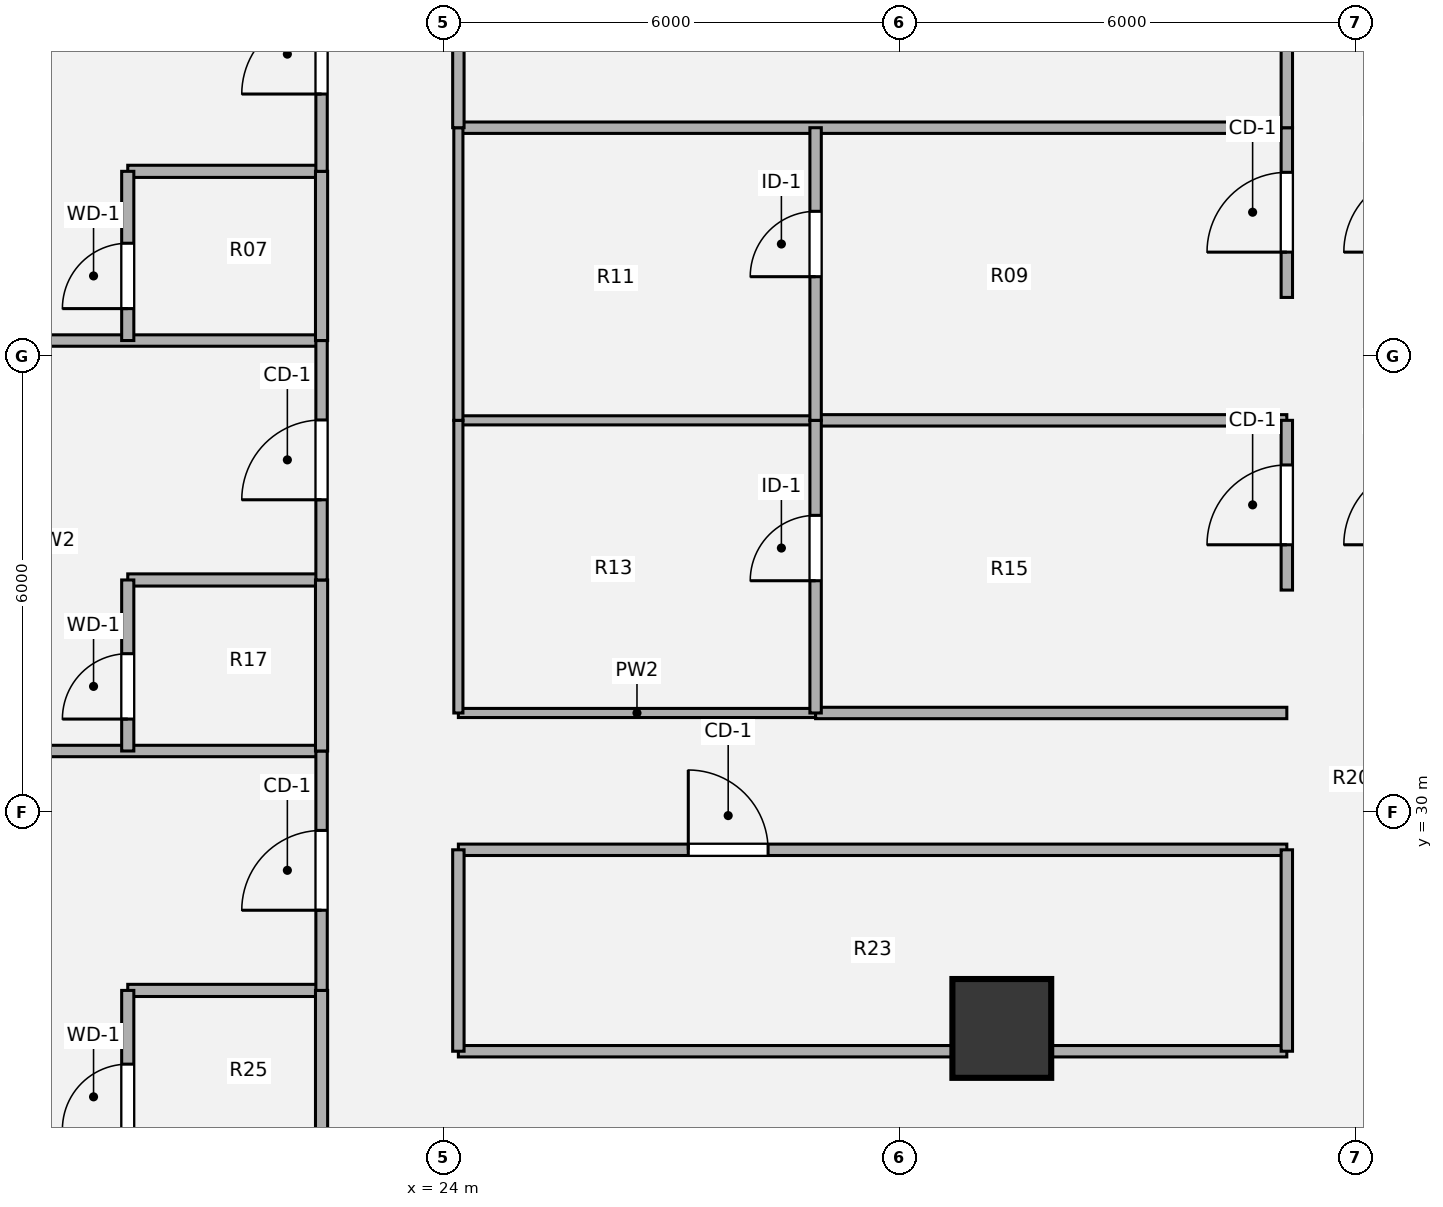
"""IFC4 building model, lengths in metres.
Left out: names, types, materials, properties, quantities, classifications, styles, units other than length and angle.
Written with IfcOpenShell. Run it as: python <this file> out.ifc"""

import sys

from ifc_helpers import new_model, si_unit, direction, frame, frame_2d, origin, origin_2d, place, context, subcontext, project, spatial, rectangle, hollow_circle, extrude, source, transform, mapped, element, fill, save


model = new_model("IFC4")
c1 = context("Model", 3, precision=1e-05, world=origin(), true_north=direction((0.0, 1.0)))
c2 = subcontext(c1, "Body", "Model", "MODEL_VIEW")
j1 = project(units=[si_unit("LENGTHUNIT", "METRE"), si_unit("PLANEANGLEUNIT", "RADIAN")], contexts=[c1])
p1 = place(None, origin())
s1 = spatial("IfcSite", under=j1, at=p1, CompositionType="ELEMENT")
p2 = place(p1, origin())
s2 = spatial("IfcBuilding", under=s1, at=p2, CompositionType="ELEMENT")
p3 = place(p2, frame((0.0, 0.0, 135.18)))
s3 = spatial("IfcBuildingStorey", under=s2, at=p3, CompositionType="ELEMENT", Elevation=135.18)
m1 = source(origin(), c2, "Body", "SweptSolid", [
    extrude(hollow_circle(Radius=0.65, WallThickness=0.045, at=origin_2d()), origin(), (0.0, 0.0, 1.0), 3.78),
])
p4 = place(p3, frame((31.35, 27.15, 0.0), z_axis=(0.0, 0.0, 1.0), x_axis=(1.0, 0.0, 0.0)))
e1 = element("IfcColumn", 1, at=p4, inside=s3, PredefinedType="COLUMN", context=c2, shape_type="MappedRepresentation", body=[
    mapped(m1, transform((0.0, 0.0, 0.0), x_axis=(1.0, 0.0, 0.0), y_axis=(0.0, 1.0, 0.0), z_axis=(0.0, 0.0, 1.0), scale=1.0)),
])
p5 = place(p3, frame((24.2, 26.85, 0.0), z_axis=(0.0, 0.0, 1.0), x_axis=(1.0, 0.0, 0.0)))
e2 = element("IfcWall", 2, at=p5, inside=s3, PredefinedType="PARTITIONING", context=c2, shape_type="SweptSolid", body=[
    extrude(rectangle(XDim=10.9, YDim=0.15, at=frame_2d((5.45, 0.0))), origin(), (0.0, 0.0, 1.0), 2.903),
])
p6 = place(p3, frame((19.85, 27.65, 0.0), z_axis=(0.0, 0.0, 1.0), x_axis=(1.0, 0.0, 0.0)))
e3 = element("IfcWall", 3, at=p6, inside=s3, PredefinedType="PLUMBINGWALL", context=c2, shape_type="SweptSolid", body=[
    extrude(rectangle(XDim=2.55, YDim=0.16, at=frame_2d((1.275, 0.0))), origin(), (0.0, 0.0, 1.0), 2.982),
])
p7 = place(p3, frame((24.2, 29.5, 0.0), z_axis=(0.0, 0.0, 1.0), x_axis=(1.0, 0.0, 0.0)))
e4 = element("IfcWall", 4, at=p7, inside=s3, PredefinedType="PARTITIONING", context=c2, shape_type="SweptSolid", body=[
    extrude(rectangle(XDim=10.9, YDim=0.15, at=frame_2d((5.45, 0.0))), origin(), (0.0, 0.0, 1.0), 2.982),
])
p8 = place(p7, frame((3.025, 0.0, 0.0)))
e5 = element("IfcOpeningElement", 5, at=p8, cuts=e4, PredefinedType="OPENING", context=c2, shape_type="SweptSolid", body=[
    extrude(rectangle(XDim=1.05, YDim=2.1, at=origin_2d()), frame((0.525, 0.085, 1.05), z_axis=(0.0, -1.0, 0.0), x_axis=(1.0, 0.0, 0.0)), (0.0, 0.0, 1.0), 0.17),
])
p9 = place(p3, frame((13.98, 30.8, 0.0), z_axis=(0.0, 0.0, 1.0), x_axis=(1.0, 0.0, 0.0)))
e6 = element("IfcWall", 6, at=p9, inside=s3, PredefinedType="PARTITIONING", context=c2, shape_type="SweptSolid", body=[
    extrude(rectangle(XDim=8.42, YDim=0.15, at=frame_2d((4.21, 0.0))), origin(), (0.0, 0.0, 1.0), 2.982),
])
p10 = place(p3, frame((24.2, 31.3, 0.0), z_axis=(0.0, 0.0, 1.0), x_axis=(1.0, 0.0, 0.0)))
e7 = element("IfcWall", 7, at=p10, inside=s3, PredefinedType="PARTITIONING", context=c2, shape_type="SweptSolid", body=[
    extrude(rectangle(XDim=4.7, YDim=0.12, at=frame_2d((2.35, 0.0))), origin(), (0.0, 0.0, 1.0), 2.982),
])
p11 = place(p3, frame((28.9, 31.3, 0.0), z_axis=(0.0, 0.0, 1.0), x_axis=(1.0, 0.0, 0.0)))
e8 = element("IfcWall", 8, at=p11, inside=s3, PredefinedType="PARTITIONING", context=c2, shape_type="SweptSolid", body=[
    extrude(rectangle(XDim=6.2, YDim=0.15, at=frame_2d((3.1, 0.0))), origin(), (0.0, 0.0, 1.0), 2.982),
])
p12 = place(p3, frame((19.85, 33.05, 0.0), z_axis=(0.0, 0.0, 1.0), x_axis=(1.0, 0.0, 0.0)))
e9 = element("IfcWall", 9, at=p12, inside=s3, PredefinedType="PLUMBINGWALL", context=c2, shape_type="SweptSolid", body=[
    extrude(rectangle(XDim=2.55, YDim=0.16, at=frame_2d((1.275, 0.0))), origin(), (0.0, 0.0, 1.0), 2.982),
])
p13 = place(p3, frame((24.2, 35.15, 0.0), z_axis=(0.0, 0.0, 1.0), x_axis=(1.0, 0.0, 0.0)))
e10 = element("IfcWall", 10, at=p13, inside=s3, PredefinedType="PARTITIONING", context=c2, shape_type="SweptSolid", body=[
    extrude(rectangle(XDim=4.7, YDim=0.12, at=frame_2d((2.35, 0.0))), origin(), (0.0, 0.0, 1.0), 2.982),
])
p14 = place(p3, frame((28.9, 35.15, 0.0), z_axis=(0.0, 0.0, 1.0), x_axis=(1.0, 0.0, 0.0)))
e11 = element("IfcWall", 11, at=p14, inside=s3, PredefinedType="PARTITIONING", context=c2, shape_type="SweptSolid", body=[
    extrude(rectangle(XDim=6.2, YDim=0.15, at=frame_2d((3.1, 0.0))), origin(), (0.0, 0.0, 1.0), 2.982),
])
p15 = place(p3, frame((13.98, 36.2, 0.0), z_axis=(0.0, 0.0, 1.0), x_axis=(1.0, 0.0, 0.0)))
e12 = element("IfcWall", 12, at=p15, inside=s3, PredefinedType="PARTITIONING", context=c2, shape_type="SweptSolid", body=[
    extrude(rectangle(XDim=8.42, YDim=0.15, at=frame_2d((4.21, 0.0))), origin(), (0.0, 0.0, 1.0), 2.982),
])
p16 = place(p3, frame((19.85, 38.426, 0.0), z_axis=(0.0, 0.0, 1.0), x_axis=(1.0, 0.0, 0.0)))
e13 = element("IfcWall", 13, at=p16, inside=s3, PredefinedType="PLUMBINGWALL", context=c2, shape_type="SweptSolid", body=[
    extrude(rectangle(XDim=2.55, YDim=0.16, at=frame_2d((1.275, 0.0))), origin(), (0.0, 0.0, 1.0), 3.055),
])
p17 = place(p3, frame((24.2, 39.0, 0.0), z_axis=(0.0, 0.0, 1.0), x_axis=(1.0, 0.0, 0.0)))
e14 = element("IfcWall", 14, at=p17, inside=s3, PredefinedType="PARTITIONING", context=c2, shape_type="SweptSolid", body=[
    extrude(rectangle(XDim=10.9, YDim=0.15, at=frame_2d((5.45, 0.0))), origin(), (0.0, 0.0, 1.0), 2.903),
])
p18 = place(p3, frame((19.85, 25.4, 0.0), z_axis=(0.0, 0.0, 1.0), x_axis=(0.0, 1.0, 0.0)))
e15 = element("IfcWall", 15, at=p18, inside=s3, PredefinedType="PLUMBINGWALL", context=c2, shape_type="SweptSolid", body=[
    extrude(rectangle(XDim=2.25, YDim=0.16, at=frame_2d((1.125, 0.0))), origin(), (0.0, 0.0, 1.0), 3.5),
])
p19 = place(p18, frame((0.42, 0.0, 0.0)))
e16 = element("IfcOpeningElement", 16, at=p19, cuts=e15, PredefinedType="OPENING", context=c2, shape_type="SweptSolid", body=[
    extrude(rectangle(XDim=0.86, YDim=2.1, at=origin_2d()), frame((0.43, 0.09, 1.05), z_axis=(0.0, -1.0, 0.0), x_axis=(1.0, 0.0, 0.0)), (0.0, 0.0, 1.0), 0.18),
])
p20 = place(p3, frame((19.85, 30.8, 0.0), z_axis=(0.0, 0.0, 1.0), x_axis=(0.0, 1.0, 0.0)))
e17 = element("IfcWall", 17, at=p20, inside=s3, PredefinedType="PLUMBINGWALL", context=c2, shape_type="SweptSolid", body=[
    extrude(rectangle(XDim=2.25, YDim=0.16, at=frame_2d((1.125, 0.0))), origin(), (0.0, 0.0, 1.0), 3.5),
])
p21 = place(p20, frame((0.42, 0.0, 0.0)))
e18 = element("IfcOpeningElement", 18, at=p21, cuts=e17, PredefinedType="OPENING", context=c2, shape_type="SweptSolid", body=[
    extrude(rectangle(XDim=0.86, YDim=2.1, at=origin_2d()), frame((0.43, 0.09, 1.05), z_axis=(0.0, -1.0, 0.0), x_axis=(1.0, 0.0, 0.0)), (0.0, 0.0, 1.0), 0.18),
])
p22 = place(p3, frame((19.85, 36.2, 0.0), z_axis=(0.0, 0.0, 1.0), x_axis=(0.0, 1.0, 0.0)))
e19 = element("IfcWall", 19, at=p22, inside=s3, PredefinedType="PLUMBINGWALL", context=c2, shape_type="SweptSolid", body=[
    extrude(rectangle(XDim=2.226, YDim=0.16, at=frame_2d((1.113, 0.0))), origin(), (0.0, 0.0, 1.0), 3.5),
])
p23 = place(p22, frame((0.42, 0.0, 0.0)))
e20 = element("IfcOpeningElement", 20, at=p23, cuts=e19, PredefinedType="OPENING", context=c2, shape_type="SweptSolid", body=[
    extrude(rectangle(XDim=0.86, YDim=2.1, at=origin_2d()), frame((0.43, 0.09, 1.05), z_axis=(0.0, -1.0, 0.0), x_axis=(1.0, 0.0, 0.0)), (0.0, 0.0, 1.0), 0.18),
])
p24 = place(p3, frame((22.4, 25.4, 0.0), z_axis=(0.0, 0.0, 1.0), x_axis=(0.0, 1.0, 0.0)))
e21 = element("IfcWall", 21, at=p24, inside=s3, PredefinedType="PLUMBINGWALL", context=c2, shape_type="SweptSolid", body=[
    extrude(rectangle(XDim=2.25, YDim=0.16, at=frame_2d((1.125, 0.0))), origin(), (0.0, 0.0, 1.0), 3.5),
])
p25 = place(p3, frame((22.4, 27.65, 0.0), z_axis=(0.0, 0.0, 1.0), x_axis=(0.0, 1.0, 0.0)))
e22 = element("IfcWall", 22, at=p25, inside=s3, PredefinedType="PARTITIONING", context=c2, shape_type="SweptSolid", body=[
    extrude(rectangle(XDim=3.15, YDim=0.15, at=frame_2d((1.575, 0.0))), origin(), (0.0, 0.0, 1.0), 3.5),
])
p26 = place(p25, frame((1.055, 0.0, 0.0)))
e23 = element("IfcOpeningElement", 23, at=p26, cuts=e22, PredefinedType="OPENING", context=c2, shape_type="SweptSolid", body=[
    extrude(rectangle(XDim=1.05, YDim=2.1, at=origin_2d()), frame((0.525, 0.085, 1.05), z_axis=(0.0, -1.0, 0.0), x_axis=(1.0, 0.0, 0.0)), (0.0, 0.0, 1.0), 0.17),
])
p27 = place(p3, frame((22.4, 30.8, 0.0), z_axis=(0.0, 0.0, 1.0), x_axis=(0.0, 1.0, 0.0)))
e24 = element("IfcWall", 24, at=p27, inside=s3, PredefinedType="PLUMBINGWALL", context=c2, shape_type="SweptSolid", body=[
    extrude(rectangle(XDim=2.25, YDim=0.16, at=frame_2d((1.125, 0.0))), origin(), (0.0, 0.0, 1.0), 3.5),
])
p28 = place(p3, frame((22.4, 33.05, 0.0), z_axis=(0.0, 0.0, 1.0), x_axis=(0.0, 1.0, 0.0)))
e25 = element("IfcWall", 25, at=p28, inside=s3, PredefinedType="PARTITIONING", context=c2, shape_type="SweptSolid", body=[
    extrude(rectangle(XDim=3.15, YDim=0.15, at=frame_2d((1.575, 0.0))), origin(), (0.0, 0.0, 1.0), 3.5),
])
p29 = place(p28, frame((1.055, 0.0, 0.0)))
e26 = element("IfcOpeningElement", 26, at=p29, cuts=e25, PredefinedType="OPENING", context=c2, shape_type="SweptSolid", body=[
    extrude(rectangle(XDim=1.05, YDim=2.1, at=origin_2d()), frame((0.525, 0.085, 1.05), z_axis=(0.0, -1.0, 0.0), x_axis=(1.0, 0.0, 0.0)), (0.0, 0.0, 1.0), 0.17),
])
p30 = place(p3, frame((22.4, 36.2, 0.0), z_axis=(0.0, 0.0, 1.0), x_axis=(0.0, 1.0, 0.0)))
e27 = element("IfcWall", 27, at=p30, inside=s3, PredefinedType="PLUMBINGWALL", context=c2, shape_type="SweptSolid", body=[
    extrude(rectangle(XDim=2.226, YDim=0.16, at=frame_2d((1.113, 0.0))), origin(), (0.0, 0.0, 1.0), 3.5),
])
p31 = place(p3, frame((22.4, 38.426, 0.0), z_axis=(0.0, 0.0, 1.0), x_axis=(0.0, 1.0, 0.0)))
e28 = element("IfcWall", 28, at=p31, inside=s3, PredefinedType="PARTITIONING", context=c2, shape_type="SweptSolid", body=[
    extrude(rectangle(XDim=3.074, YDim=0.15, at=frame_2d((1.537, 0.0))), origin(), (0.0, 0.0, 1.0), 3.5),
])
p32 = place(p31, frame((1.017, 0.0, 0.0)))
e29 = element("IfcOpeningElement", 29, at=p32, cuts=e28, PredefinedType="OPENING", context=c2, shape_type="SweptSolid", body=[
    extrude(rectangle(XDim=1.05, YDim=2.1, at=origin_2d()), frame((0.525, 0.085, 1.05), z_axis=(0.0, -1.0, 0.0), x_axis=(1.0, 0.0, 0.0)), (0.0, 0.0, 1.0), 0.17),
])
p33 = place(p3, frame((24.2, 26.85, 0.0), z_axis=(0.0, 0.0, 1.0), x_axis=(0.0, 1.0, 0.0)))
e30 = element("IfcWall", 30, at=p33, inside=s3, PredefinedType="PARTITIONING", context=c2, shape_type="SweptSolid", body=[
    extrude(rectangle(XDim=2.65, YDim=0.15, at=frame_2d((1.325, 0.0))), origin(), (0.0, 0.0, 1.0), 3.5),
])
p34 = place(p3, frame((24.2, 31.3, 0.0), z_axis=(0.0, 0.0, 1.0), x_axis=(0.0, 1.0, 0.0)))
e31 = element("IfcWall", 31, at=p34, inside=s3, PredefinedType="PARTITIONING", context=c2, shape_type="SweptSolid", body=[
    extrude(rectangle(XDim=3.85, YDim=0.12, at=frame_2d((1.925, 0.0))), origin(), (0.0, 0.0, 1.0), 3.5),
])
p35 = place(p3, frame((24.2, 35.15, 0.0), z_axis=(0.0, 0.0, 1.0), x_axis=(0.0, 1.0, 0.0)))
e32 = element("IfcWall", 32, at=p35, inside=s3, PredefinedType="PARTITIONING", context=c2, shape_type="SweptSolid", body=[
    extrude(rectangle(XDim=3.85, YDim=0.12, at=frame_2d((1.925, 0.0))), origin(), (0.0, 0.0, 1.0), 3.5),
])
p36 = place(p3, frame((24.2, 39.0, 0.0), z_axis=(0.0, 0.0, 1.0), x_axis=(0.0, 1.0, 0.0)))
e33 = element("IfcWall", 33, at=p36, inside=s3, PredefinedType="PARTITIONING", context=c2, shape_type="SweptSolid", body=[
    extrude(rectangle(XDim=8.321, YDim=0.15, at=frame_2d((4.16, 0.0))), origin(), (0.0, 0.0, 1.0), 3.5),
])
p37 = place(p3, frame((28.9, 31.3, 0.0), z_axis=(0.0, 0.0, 1.0), x_axis=(0.0, 1.0, 0.0)))
e34 = element("IfcWall", 34, at=p37, inside=s3, PredefinedType="PARTITIONING", context=c2, shape_type="SweptSolid", body=[
    extrude(rectangle(XDim=3.85, YDim=0.15, at=frame_2d((1.925, 0.0))), origin(), (0.0, 0.0, 1.0), 3.5),
])
p38 = place(p37, frame((1.74, 0.0, 0.0)))
e35 = element("IfcOpeningElement", 35, at=p38, cuts=e34, PredefinedType="OPENING", context=c2, shape_type="SweptSolid", body=[
    extrude(rectangle(XDim=0.86, YDim=2.1, at=origin_2d()), frame((0.43, 0.085, 1.05), z_axis=(0.0, -1.0, 0.0), x_axis=(1.0, 0.0, 0.0)), (0.0, 0.0, 1.0), 0.17),
])
p39 = place(p3, frame((28.9, 35.15, 0.0), z_axis=(0.0, 0.0, 1.0), x_axis=(0.0, 1.0, 0.0)))
e36 = element("IfcWall", 36, at=p39, inside=s3, PredefinedType="PARTITIONING", context=c2, shape_type="SweptSolid", body=[
    extrude(rectangle(XDim=3.85, YDim=0.15, at=frame_2d((1.925, 0.0))), origin(), (0.0, 0.0, 1.0), 3.5),
])
p40 = place(p39, frame((1.89, 0.0, 0.0)))
e37 = element("IfcOpeningElement", 37, at=p40, cuts=e36, PredefinedType="OPENING", context=c2, shape_type="SweptSolid", body=[
    extrude(rectangle(XDim=0.86, YDim=2.1, at=origin_2d()), frame((0.43, 0.085, 1.05), z_axis=(0.0, -1.0, 0.0), x_axis=(1.0, 0.0, 0.0)), (0.0, 0.0, 1.0), 0.17),
])
p41 = place(p3, frame((35.1, 26.85, 0.0), z_axis=(0.0, 0.0, 1.0), x_axis=(0.0, 1.0, 0.0)))
e38 = element("IfcWall", 38, at=p41, inside=s3, PredefinedType="PARTITIONING", context=c2, shape_type="SweptSolid", body=[
    extrude(rectangle(XDim=2.65, YDim=0.15, at=frame_2d((1.325, 0.0))), origin(), (0.0, 0.0, 1.0), 3.5),
])
p42 = place(p3, frame((35.1, 32.917, 0.0), z_axis=(0.0, 0.0, 1.0), x_axis=(0.0, 1.0, 0.0)))
e39 = element("IfcWall", 39, at=p42, inside=s3, PredefinedType="PARTITIONING", context=c2, shape_type="SweptSolid", body=[
    extrude(rectangle(XDim=2.233, YDim=0.15, at=frame_2d((1.116, 0.0))), origin(), (0.0, 0.0, 1.0), 3.5),
])
p43 = place(p42, frame((0.596, 0.0, 0.0)))
e40 = element("IfcOpeningElement", 40, at=p43, cuts=e39, PredefinedType="OPENING", context=c2, shape_type="SweptSolid", body=[
    extrude(rectangle(XDim=1.05, YDim=2.1, at=origin_2d()), frame((0.525, 0.085, 1.05), z_axis=(0.0, -1.0, 0.0), x_axis=(1.0, 0.0, 0.0)), (0.0, 0.0, 1.0), 0.17),
])
p44 = place(p3, frame((35.1, 36.767, 0.0), z_axis=(0.0, 0.0, 1.0), x_axis=(0.0, 1.0, 0.0)))
e41 = element("IfcWall", 41, at=p44, inside=s3, PredefinedType="PARTITIONING", context=c2, shape_type="SweptSolid", body=[
    extrude(rectangle(XDim=2.233, YDim=0.15, at=frame_2d((1.116, 0.0))), origin(), (0.0, 0.0, 1.0), 3.5),
])
p45 = place(p44, frame((0.596, 0.0, 0.0)))
e42 = element("IfcOpeningElement", 42, at=p45, cuts=e41, PredefinedType="OPENING", context=c2, shape_type="SweptSolid", body=[
    extrude(rectangle(XDim=1.05, YDim=2.1, at=origin_2d()), frame((0.525, 0.085, 1.05), z_axis=(0.0, -1.0, 0.0), x_axis=(1.0, 0.0, 0.0)), (0.0, 0.0, 1.0), 0.17),
])
p46 = place(p3, frame((35.1, 39.0, 0.0), z_axis=(0.0, 0.0, 1.0), x_axis=(0.0, 1.0, 0.0)))
e43 = element("IfcWall", 43, at=p46, inside=s3, PredefinedType="PARTITIONING", context=c2, shape_type="SweptSolid", body=[
    extrude(rectangle(XDim=7.7, YDim=0.15, at=frame_2d((3.85, 0.0))), origin(), (0.0, 0.0, 1.0), 3.5),
])
p47 = place(p46, frame((3.475, 0.0, 0.0)))
e44 = element("IfcOpeningElement", 44, at=p47, cuts=e43, PredefinedType="OPENING", context=c2, shape_type="SweptSolid", body=[
    extrude(rectangle(XDim=1.05, YDim=2.1, at=origin_2d()), frame((0.525, 0.085, 1.05), z_axis=(0.0, -1.0, 0.0), x_axis=(1.0, 0.0, 0.0)), (0.0, 0.0, 1.0), 0.17),
])
m2 = source(origin(), c2, "Body", "SweptSolid", [
    extrude(rectangle(XDim=1.05, YDim=2.1, at=origin_2d()), frame((0.525, 0.025, 1.05), z_axis=(0.0, -1.0, 0.0), x_axis=(1.0, 0.0, 0.0)), (0.0, 0.0, 1.0), 0.05),
])
p48 = place(p8, origin())
e45 = element("IfcDoor", 45, at=p48, inside=s3, OperationType="SINGLE_SWING_LEFT", PredefinedType="DOOR", context=c2, shape_type="MappedRepresentation", body=[
    mapped(m2, transform((0.0, 0.0, 0.0), x_axis=(1.0, 0.0, 0.0), y_axis=(0.0, 1.0, 0.0), z_axis=(0.0, 0.0, 1.0), scale=1.0)),
])
fill(e5, e45)
m3 = source(origin(), c2, "Body", "SweptSolid", [
    extrude(rectangle(XDim=0.86, YDim=2.1, at=origin_2d()), frame((0.43, 0.025, 1.05), z_axis=(0.0, -1.0, 0.0), x_axis=(1.0, 0.0, 0.0)), (0.0, 0.0, 1.0), 0.05),
])
p49 = place(p19, origin())
e46 = element("IfcDoor", 46, at=p49, inside=s3, OperationType="SINGLE_SWING_LEFT", PredefinedType="DOOR", context=c2, shape_type="MappedRepresentation", body=[
    mapped(m3, transform((0.0, 0.0, 0.0), x_axis=(1.0, 0.0, 0.0), y_axis=(0.0, 1.0, 0.0), z_axis=(0.0, 0.0, 1.0), scale=1.0)),
])
fill(e16, e46)
p50 = place(p21, origin())
e47 = element("IfcDoor", 47, at=p50, inside=s3, OperationType="SINGLE_SWING_LEFT", PredefinedType="DOOR", context=c2, shape_type="MappedRepresentation", body=[
    mapped(m3, transform((0.0, 0.0, 0.0), x_axis=(1.0, 0.0, 0.0), y_axis=(0.0, 1.0, 0.0), z_axis=(0.0, 0.0, 1.0), scale=1.0)),
])
fill(e18, e47)
p51 = place(p23, origin())
e48 = element("IfcDoor", 48, at=p51, inside=s3, OperationType="SINGLE_SWING_LEFT", PredefinedType="DOOR", context=c2, shape_type="MappedRepresentation", body=[
    mapped(m3, transform((0.0, 0.0, 0.0), x_axis=(1.0, 0.0, 0.0), y_axis=(0.0, 1.0, 0.0), z_axis=(0.0, 0.0, 1.0), scale=1.0)),
])
fill(e20, e48)
p52 = place(p26, origin())
e49 = element("IfcDoor", 49, at=p52, inside=s3, OperationType="SINGLE_SWING_LEFT", PredefinedType="DOOR", context=c2, shape_type="MappedRepresentation", body=[
    mapped(m2, transform((0.0, 0.0, 0.0), x_axis=(1.0, 0.0, 0.0), y_axis=(0.0, 1.0, 0.0), z_axis=(0.0, 0.0, 1.0), scale=1.0)),
])
fill(e23, e49)
p53 = place(p29, origin())
e50 = element("IfcDoor", 50, at=p53, inside=s3, OperationType="SINGLE_SWING_LEFT", PredefinedType="DOOR", context=c2, shape_type="MappedRepresentation", body=[
    mapped(m2, transform((0.0, 0.0, 0.0), x_axis=(1.0, 0.0, 0.0), y_axis=(0.0, 1.0, 0.0), z_axis=(0.0, 0.0, 1.0), scale=1.0)),
])
fill(e26, e50)
p54 = place(p32, origin())
e51 = element("IfcDoor", 51, at=p54, inside=s3, OperationType="SINGLE_SWING_LEFT", PredefinedType="DOOR", context=c2, shape_type="MappedRepresentation", body=[
    mapped(m2, transform((0.0, 0.0, 0.0), x_axis=(1.0, 0.0, 0.0), y_axis=(0.0, 1.0, 0.0), z_axis=(0.0, 0.0, 1.0), scale=1.0)),
])
fill(e29, e51)
m4 = source(origin(), c2, "Body", "SweptSolid", [
    extrude(rectangle(XDim=0.86, YDim=2.1, at=origin_2d()), frame((0.43, 0.025, 1.05), z_axis=(0.0, -1.0, 0.0), x_axis=(1.0, 0.0, 0.0)), (0.0, 0.0, 1.0), 0.05),
])
p55 = place(p38, origin())
e52 = element("IfcDoor", 52, at=p55, inside=s3, OperationType="SINGLE_SWING_LEFT", PredefinedType="DOOR", context=c2, shape_type="MappedRepresentation", body=[
    mapped(m4, transform((0.0, 0.0, 0.0), x_axis=(1.0, 0.0, 0.0), y_axis=(0.0, 1.0, 0.0), z_axis=(0.0, 0.0, 1.0), scale=1.0)),
])
fill(e35, e52)
p56 = place(p40, origin())
e53 = element("IfcDoor", 53, at=p56, inside=s3, OperationType="SINGLE_SWING_LEFT", PredefinedType="DOOR", context=c2, shape_type="MappedRepresentation", body=[
    mapped(m4, transform((0.0, 0.0, 0.0), x_axis=(1.0, 0.0, 0.0), y_axis=(0.0, 1.0, 0.0), z_axis=(0.0, 0.0, 1.0), scale=1.0)),
])
fill(e37, e53)
p57 = place(p43, origin())
e54 = element("IfcDoor", 54, at=p57, inside=s3, OperationType="SINGLE_SWING_LEFT", PredefinedType="DOOR", context=c2, shape_type="MappedRepresentation", body=[
    mapped(m2, transform((0.0, 0.0, 0.0), x_axis=(1.0, 0.0, 0.0), y_axis=(0.0, 1.0, 0.0), z_axis=(0.0, 0.0, 1.0), scale=1.0)),
])
fill(e40, e54)
p58 = place(p45, origin())
e55 = element("IfcDoor", 55, at=p58, inside=s3, OperationType="SINGLE_SWING_LEFT", PredefinedType="DOOR", context=c2, shape_type="MappedRepresentation", body=[
    mapped(m2, transform((0.0, 0.0, 0.0), x_axis=(1.0, 0.0, 0.0), y_axis=(0.0, 1.0, 0.0), z_axis=(0.0, 0.0, 1.0), scale=1.0)),
])
fill(e42, e55)
save(model, sys.argv[1])
